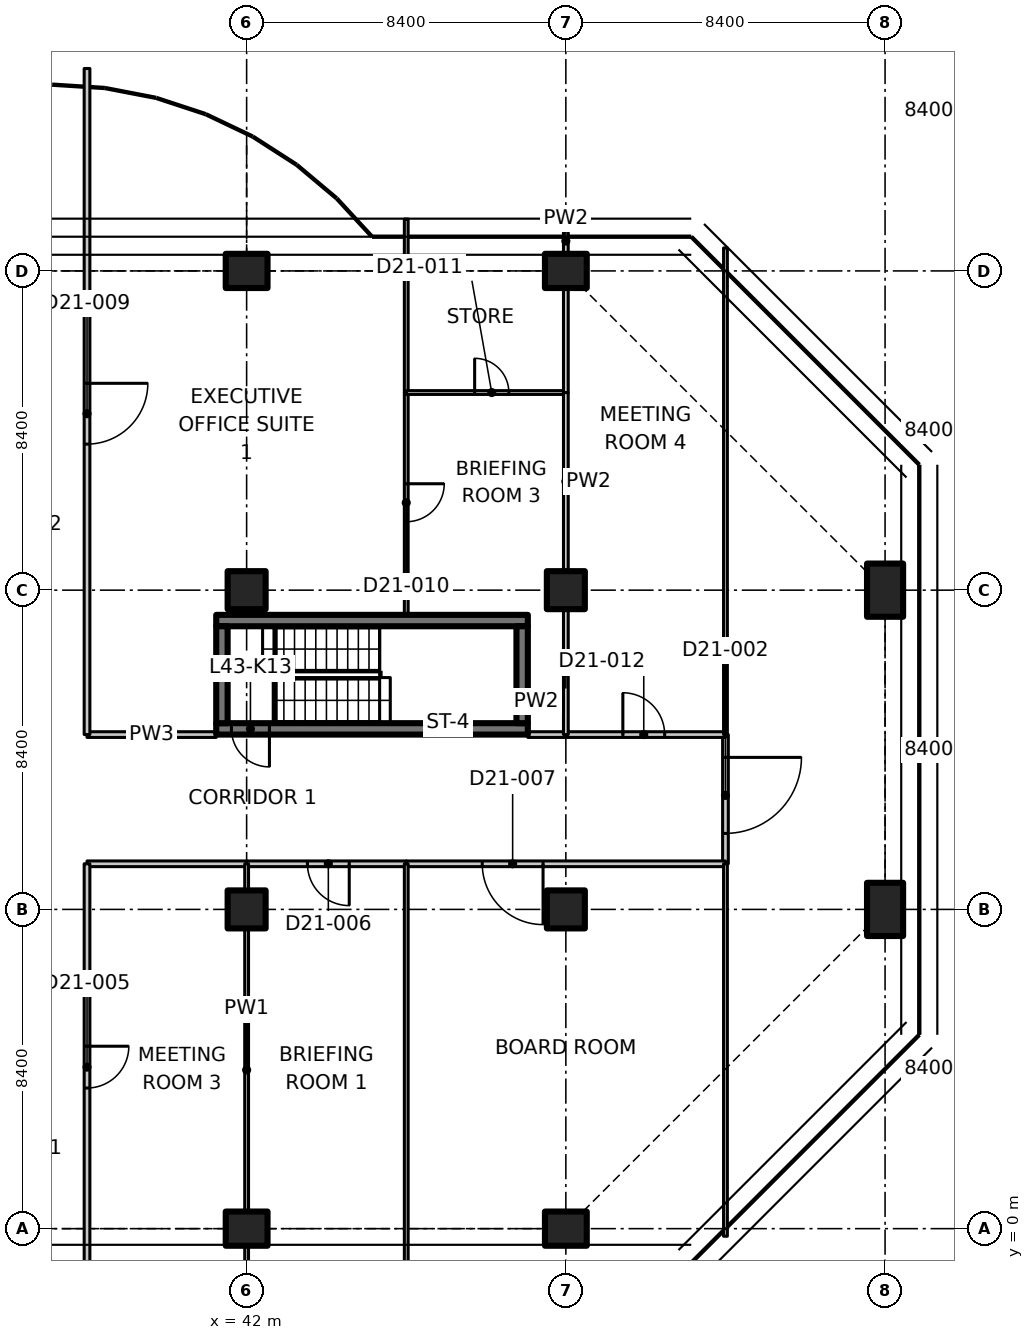
"""IFC4 building model, lengths in metres.
Left out: names, types, materials, properties, quantities, classifications, styles, units other than length and angle.
Written with IfcOpenShell. Run it as: python <this file> out.ifc"""

import sys

from ifc_helpers import new_model, si_unit, direction, frame, frame_2d, origin, origin_2d, place, context, subcontext, project, spatial, polyline, rectangle, outline, extrude, element, fill, save


model = new_model("IFC4")
c1 = context("Model", 3, precision=1e-05, world=origin(), true_north=direction((0.0, 1.0)))
c2 = subcontext(c1, "Body", "Model", "MODEL_VIEW")
j1 = project(units=[si_unit("LENGTHUNIT", "METRE"), si_unit("PLANEANGLEUNIT", "RADIAN")], contexts=[c1])
p1 = place(None, origin())
s1 = spatial("IfcSite", under=j1, at=p1, CompositionType="ELEMENT")
p2 = place(p1, origin())
s2 = spatial("IfcBuilding", under=s1, at=p2, CompositionType="ELEMENT")
p3 = place(p2, frame((0.0, 0.0, 174.0)))
s3 = spatial("IfcBuildingStorey", under=s2, at=p3, CompositionType="ELEMENT", Elevation=174.0)
p4 = place(p3, frame((42.0, 0.0, 0.0), z_axis=(0.0, 0.0, 1.0), x_axis=(0.0, 1.0, 0.0)))
e1 = element("IfcColumn", 1, at=p4, inside=s3, PredefinedType="COLUMN", context=c2, shape_type="SweptSolid", body=[
    extrude(rectangle(XDim=0.9, YDim=1.1, at=origin_2d()), origin(), (0.0, 0.0, 1.0), 3.35),
])
for number, where, z_axis, x_axis in (
    (2, (42.0, 8.4, 0.0), (0.0, 0.0, 1.0), (1.0, 0.0, 0.0)),
    (3, (42.0, 16.8, 0.0), (0.0, 0.0, 1.0), (1.0, 0.0, 0.0)),
):
    element("IfcColumn", number, at=place(p3, frame(where, z_axis=z_axis, x_axis=x_axis)), inside=s3, PredefinedType="COLUMN", context=c2, shape_type="SweptSolid", body=[
        extrude(rectangle(XDim=1.0, YDim=1.0, at=origin_2d()), origin(), (0.0, 0.0, 1.0), 3.35),
    ])
for number, where, z_axis, x_axis in (
    (4, (42.0, 25.2, 0.0), (0.0, 0.0, 1.0), (0.0, 1.0, 0.0)),
    (5, (50.4, 0.0, 0.0), (0.0, 0.0, 1.0), (0.0, 1.0, 0.0)),
):
    element("IfcColumn", number, at=place(p3, frame(where, z_axis=z_axis, x_axis=x_axis)), inside=s3, PredefinedType="COLUMN", context=c2, shape_type="SweptSolid", body=[
        extrude(rectangle(XDim=0.9, YDim=1.1, at=origin_2d()), origin(), (0.0, 0.0, 1.0), 3.35),
    ])
for number, where, z_axis, x_axis in (
    (6, (50.4, 8.4, 0.0), (0.0, 0.0, 1.0), (1.0, 0.0, 0.0)),
    (7, (50.4, 16.8, 0.0), (0.0, 0.0, 1.0), (1.0, 0.0, 0.0)),
):
    element("IfcColumn", number, at=place(p3, frame(where, z_axis=z_axis, x_axis=x_axis)), inside=s3, PredefinedType="COLUMN", context=c2, shape_type="SweptSolid", body=[
        extrude(rectangle(XDim=1.0, YDim=1.0, at=origin_2d()), origin(), (0.0, 0.0, 1.0), 3.35),
    ])
p5 = place(p3, frame((50.4, 25.2, 0.0), z_axis=(0.0, 0.0, 1.0), x_axis=(0.0, 1.0, 0.0)))
e8 = element("IfcColumn", 8, at=p5, inside=s3, PredefinedType="COLUMN", context=c2, shape_type="SweptSolid", body=[
    extrude(rectangle(XDim=0.9, YDim=1.1, at=origin_2d()), origin(), (0.0, 0.0, 1.0), 3.35),
])
for number, where, z_axis, x_axis in (
    (9, (58.8, 8.4, 0.0), (0.0, 0.0, 1.0), (1.0, 0.0, 0.0)),
    (10, (58.8, 16.8, 0.0), (0.0, 0.0, 1.0), (1.0, 0.0, 0.0)),
):
    element("IfcColumn", number, at=place(p3, frame(where, z_axis=z_axis, x_axis=x_axis)), inside=s3, PredefinedType="COLUMN", context=c2, shape_type="SweptSolid", body=[
        extrude(rectangle(XDim=0.95, YDim=1.4, at=origin_2d()), origin(), (0.0, 0.0, 1.0), 3.35),
    ])
p6 = place(p3, frame((49.4, 13.15, 0.0), z_axis=(0.0, 0.0, 1.0), x_axis=(-1.0, 0.0, 0.0)))
e11 = element("IfcWall", 11, at=p6, inside=s3, PredefinedType="SHEAR", context=c2, shape_type="SweptSolid", body=[
    extrude(rectangle(XDim=8.2, YDim=0.3, at=frame_2d((4.1, 0.0))), origin(), (0.0, 0.0, 1.0), 3.35),
])
p7 = place(p6, frame((6.8, 0.0, 0.0)))
e12 = element("IfcOpeningElement", 12, at=p7, cuts=e11, PredefinedType="OPENING", context=c2, shape_type="SweptSolid", body=[
    extrude(rectangle(XDim=1.0, YDim=2.1, at=frame_2d((0.5, 1.05))), frame((0.0, 0.16, 0.0), z_axis=(0.0, -1.0, 0.0), x_axis=(1.0, 0.0, 0.0)), (0.0, 0.0, 1.0), 0.32),
])
p8 = place(p3, frame((41.2, 16.0, 0.0), z_axis=(0.0, 0.0, 1.0), x_axis=(1.0, 0.0, 0.0)))
e13 = element("IfcWall", 13, at=p8, inside=s3, PredefinedType="SHEAR", context=c2, shape_type="SweptSolid", body=[
    extrude(rectangle(XDim=8.2, YDim=0.3, at=frame_2d((4.1, 0.0))), origin(), (0.0, 0.0, 1.0), 3.35),
])
for number, where, z_axis, x_axis in (
    (14, (41.35, 13.3, 0.0), (0.0, 0.0, 1.0), (0.0, 1.0, 0.0)),
    (15, (49.25, 13.3, 0.0), (0.0, 0.0, 1.0), (0.0, 1.0, 0.0)),
):
    element("IfcWall", number, at=place(p3, frame(where, z_axis=z_axis, x_axis=x_axis)), inside=s3, PredefinedType="SHEAR", context=c2, shape_type="SweptSolid", body=[
        extrude(rectangle(XDim=2.55, YDim=0.3, at=frame_2d((1.275, 0.0))), origin(), (0.0, 0.0, 1.0), 3.35),
    ])
p9 = place(p3, frame((54.6, 13.0, 0.0), z_axis=(0.0, 0.0, 1.0), x_axis=(0.0, -1.0, 0.0)))
e16 = element("IfcWall", 16, at=p9, inside=s3, PredefinedType="PARTITIONING", context=c2, shape_type="SweptSolid", body=[
    extrude(rectangle(XDim=3.4, YDim=0.15, at=frame_2d((1.7, 0.0))), origin(), (0.0, 0.0, 1.0), 3.33),
])
p10 = place(p9, frame((0.6, 0.0, 0.0)))
e17 = element("IfcOpeningElement", 17, at=p10, cuts=e16, PredefinedType="OPENING", context=c2, shape_type="SweptSolid", body=[
    extrude(rectangle(XDim=2.0, YDim=2.4, at=frame_2d((1.0, 1.2))), frame((0.0, 0.085, 0.0), z_axis=(0.0, -1.0, 0.0), x_axis=(1.0, 0.0, 0.0)), (0.0, 0.0, 1.0), 0.17),
])
p11 = place(p3, frame((42.0, 9.6, 0.0), z_axis=(0.0, 0.0, 1.0), x_axis=(-1.0, 0.0, 0.0)))
e18 = element("IfcWall", 18, at=p11, inside=s3, PredefinedType="PARTITIONING", context=c2, shape_type="SweptSolid", body=[
    extrude(rectangle(XDim=4.2, YDim=0.15, at=frame_2d((2.1, 0.0))), origin(), (0.0, 0.0, 1.0), 3.33),
])
p12 = place(p3, frame((46.2, 9.6, 0.0), z_axis=(0.0, 0.0, 1.0), x_axis=(-1.0, 0.0, 0.0)))
e19 = element("IfcWall", 19, at=p12, inside=s3, PredefinedType="PARTITIONING", context=c2, shape_type="SweptSolid", body=[
    extrude(rectangle(XDim=4.2, YDim=0.15, at=frame_2d((2.1, 0.0))), origin(), (0.0, 0.0, 1.0), 3.33),
])
p13 = place(p12, frame((1.5, 0.0, 0.0)))
e20 = element("IfcOpeningElement", 20, at=p13, cuts=e19, PredefinedType="OPENING", context=c2, shape_type="SweptSolid", body=[
    extrude(rectangle(XDim=1.1, YDim=2.1, at=frame_2d((0.55, 1.05))), frame((0.0, 0.085, 0.0), z_axis=(0.0, -1.0, 0.0), x_axis=(1.0, 0.0, 0.0)), (0.0, 0.0, 1.0), 0.17),
])
p14 = place(p3, frame((54.6, 9.6, 0.0), z_axis=(0.0, 0.0, 1.0), x_axis=(-1.0, 0.0, 0.0)))
e21 = element("IfcWall", 21, at=p14, inside=s3, PredefinedType="PARTITIONING", context=c2, shape_type="SweptSolid", body=[
    extrude(rectangle(XDim=8.4, YDim=0.15, at=frame_2d((4.2, 0.0))), origin(), (0.0, 0.0, 1.0), 3.33),
])
p15 = place(p14, frame((4.8, 0.0, 0.0)))
e22 = element("IfcOpeningElement", 22, at=p15, cuts=e21, PredefinedType="OPENING", context=c2, shape_type="SweptSolid", body=[
    extrude(rectangle(XDim=1.6, YDim=2.1, at=frame_2d((0.8, 1.05))), frame((0.0, 0.085, 0.0), z_axis=(0.0, -1.0, 0.0), x_axis=(1.0, 0.0, 0.0)), (0.0, 0.0, 1.0), 0.17),
])
p16 = place(p3, frame((37.8, 13.0, 0.0), z_axis=(0.0, 0.0, 1.0), x_axis=(1.0, 0.0, 0.0)))
e23 = element("IfcWall", 23, at=p16, inside=s3, PredefinedType="PARTITIONING", context=c2, shape_type="SweptSolid", body=[
    extrude(rectangle(XDim=3.4, YDim=0.15, at=frame_2d((1.7, 0.0))), origin(), (0.0, 0.0, 1.0), 3.33),
])
p17 = place(p3, frame((49.4, 13.0, 0.0), z_axis=(0.0, 0.0, 1.0), x_axis=(1.0, 0.0, 0.0)))
e24 = element("IfcWall", 24, at=p17, inside=s3, PredefinedType="PARTITIONING", context=c2, shape_type="SweptSolid", body=[
    extrude(rectangle(XDim=1.0, YDim=0.15, at=frame_2d((0.5, 0.0))), origin(), (0.0, 0.0, 1.0), 3.33),
])
p18 = place(p3, frame((50.4, 13.0, 0.0), z_axis=(0.0, 0.0, 1.0), x_axis=(1.0, 0.0, 0.0)))
e25 = element("IfcWall", 25, at=p18, inside=s3, PredefinedType="PARTITIONING", context=c2, shape_type="SweptSolid", body=[
    extrude(rectangle(XDim=4.2, YDim=0.15, at=frame_2d((2.1, 0.0))), origin(), (0.0, 0.0, 1.0), 3.33),
])
p19 = place(p18, frame((1.5, 0.0, 0.0)))
e26 = element("IfcOpeningElement", 26, at=p19, cuts=e25, PredefinedType="OPENING", context=c2, shape_type="SweptSolid", body=[
    extrude(rectangle(XDim=1.1, YDim=2.1, at=frame_2d((0.55, 1.05))), frame((0.0, 0.085, 0.0), z_axis=(0.0, -1.0, 0.0), x_axis=(1.0, 0.0, 0.0)), (0.0, 0.0, 1.0), 0.17),
])
p20 = place(p3, frame((54.6, -0.2, 0.0), z_axis=(0.0, 0.0, 1.0), x_axis=(0.0, 1.0, 0.0)))
e27 = element("IfcWall", 27, at=p20, inside=s3, PredefinedType="PARTITIONING", context=c2, shape_type="SweptSolid", body=[
    extrude(outline(polyline([(0.0, 0.0), (9.8, 0.0), (9.8, 3.33), (5.066, 3.33), (5.064, 2.98), (3.736, 2.98), (3.734, 3.33), (0.0, 3.33), (0.0, 0.0)])), frame((0.0, 0.05, 0.0), z_axis=(0.0, -1.0, 0.0), x_axis=(1.0, 0.0, 0.0)), (0.0, 0.0, 1.0), 0.1),
])
p21 = place(p3, frame((54.6, 13.0, 0.0), z_axis=(0.0, 0.0, 1.0), x_axis=(0.0, 1.0, 0.0)))
e28 = element("IfcWall", 28, at=p21, inside=s3, PredefinedType="PARTITIONING", context=c2, shape_type="SweptSolid", body=[
    extrude(outline(polyline([(0.0, 0.0), (12.805, 0.0), (12.805, 3.33), (12.4, 3.33), (8.666, 3.33), (8.664, 2.98), (7.336, 2.98), (7.334, 3.33), (0.0, 3.33), (0.0, 0.0)])), frame((0.0, 0.05, 0.0), z_axis=(0.0, -1.0, 0.0), x_axis=(1.0, 0.0, 0.0)), (0.0, 0.0, 1.0), 0.1),
])
p22 = place(p3, frame((37.8, 9.6, 0.0), z_axis=(0.0, 0.0, 1.0), x_axis=(0.0, -1.0, 0.0)))
e29 = element("IfcWall", 29, at=p22, inside=s3, PredefinedType="PARTITIONING", context=c2, shape_type="SweptSolid", body=[
    extrude(outline(polyline([(0.0, 0.0), (10.774, 0.0), (10.774, 3.33), (10.7, 3.33), (10.05, 3.33), (10.048, 2.98), (9.152, 2.98), (9.15, 3.33), (0.0, 3.33), (0.0, 0.0)])), frame((0.0, 0.075, 0.0), z_axis=(0.0, -1.0, 0.0), x_axis=(1.0, 0.0, 0.0)), (0.0, 0.0, 1.0), 0.15),
])
p23 = place(p22, frame((4.8, 0.0, 0.0)))
e30 = element("IfcOpeningElement", 30, at=p23, cuts=e29, PredefinedType="OPENING", context=c2, shape_type="SweptSolid", body=[
    extrude(rectangle(XDim=1.1, YDim=2.1, at=frame_2d((0.55, 1.05))), frame((0.0, 0.085, 0.0), z_axis=(0.0, -1.0, 0.0), x_axis=(1.0, 0.0, 0.0)), (0.0, 0.0, 1.0), 0.17),
])
p24 = place(p3, frame((42.0, 9.6, 0.0), z_axis=(0.0, 0.0, 1.0), x_axis=(0.0, -1.0, 0.0)))
e31 = element("IfcWall", 31, at=p24, inside=s3, PredefinedType="PARTITIONING", context=c2, shape_type="SweptSolid", body=[
    extrude(rectangle(XDim=0.68, YDim=0.1, at=frame_2d((0.34, 0.0))), origin(), (0.0, 0.0, 1.0), 3.33),
])
p25 = place(p3, frame((42.0, 7.88, 0.0), z_axis=(0.0, 0.0, 1.0), x_axis=(0.0, -1.0, 0.0)))
e32 = element("IfcWall", 32, at=p25, inside=s3, PredefinedType="PARTITIONING", context=c2, shape_type="SweptSolid", body=[
    extrude(rectangle(XDim=7.41, YDim=0.1, at=frame_2d((3.705, 0.0))), origin(), (0.0, 0.0, 1.0), 3.33),
])
p26 = place(p3, frame((42.0, -0.47, 0.0), z_axis=(0.0, 0.0, 1.0), x_axis=(0.0, -1.0, 0.0)))
e33 = element("IfcWall", 33, at=p26, inside=s3, PredefinedType="PARTITIONING", context=c2, shape_type="SweptSolid", body=[
    extrude(rectangle(XDim=0.63, YDim=0.1, at=frame_2d((0.315, 0.0))), origin(), (0.0, 0.0, 1.0), 3.33),
])
p27 = place(p3, frame((46.2, 9.6, 0.0), z_axis=(0.0, 0.0, 1.0), x_axis=(0.0, -1.0, 0.0)))
e34 = element("IfcWall", 34, at=p27, inside=s3, PredefinedType="PARTITIONING", context=c2, shape_type="SweptSolid", body=[
    extrude(outline(polyline([(0.0, 0.0), (10.774, 0.0), (10.774, 3.33), (10.7, 3.33), (10.05, 3.33), (10.048, 2.98), (9.152, 2.98), (9.15, 3.33), (0.0, 3.33), (0.0, 0.0)])), frame((0.0, 0.05, 0.0), z_axis=(0.0, -1.0, 0.0), x_axis=(1.0, 0.0, 0.0)), (0.0, 0.0, 1.0), 0.1),
])
p28 = place(p3, frame((37.8, 30.526, 0.0), z_axis=(0.0, 0.0, 1.0), x_axis=(0.0, -1.0, 0.0)))
e35 = element("IfcWall", 35, at=p28, inside=s3, PredefinedType="PARTITIONING", context=c2, shape_type="SweptSolid", body=[
    extrude(outline(polyline([(0.0, 0.0), (17.526, 0.0), (17.526, 3.33), (5.776, 3.33), (5.774, 2.98), (4.878, 2.98), (4.876, 3.33), (0.283, 3.33), (0.0, 3.33), (0.0, 0.0)])), frame((0.0, 0.075, 0.0), z_axis=(0.0, -1.0, 0.0), x_axis=(1.0, 0.0, 0.0)), (0.0, 0.0, 1.0), 0.15),
])
p29 = place(p28, frame((8.283, 0.0, 0.0)))
e36 = element("IfcOpeningElement", 36, at=p29, cuts=e35, PredefinedType="OPENING", context=c2, shape_type="SweptSolid", body=[
    extrude(rectangle(XDim=1.6, YDim=2.1, at=frame_2d((0.8, 1.05))), frame((0.0, 0.085, 0.0), z_axis=(0.0, -1.0, 0.0), x_axis=(1.0, 0.0, 0.0)), (0.0, 0.0, 1.0), 0.17),
])
p30 = place(p3, frame((46.2, 22.0, 0.0), z_axis=(0.0, 0.0, 1.0), x_axis=(0.0, -1.0, 0.0)))
e37 = element("IfcWall", 37, at=p30, inside=s3, PredefinedType="PARTITIONING", context=c2, shape_type="SweptSolid", body=[
    extrude(rectangle(XDim=5.85, YDim=0.1, at=frame_2d((2.925, 0.0))), origin(), (0.0, 0.0, 1.0), 3.33),
])
p31 = place(p30, frame((2.4, 0.0, 0.0)))
e38 = element("IfcOpeningElement", 38, at=p31, cuts=e37, PredefinedType="OPENING", context=c2, shape_type="SweptSolid", body=[
    extrude(rectangle(XDim=1.0, YDim=2.1, at=frame_2d((0.5, 1.05))), frame((0.0, 0.06, 0.0), z_axis=(0.0, -1.0, 0.0), x_axis=(1.0, 0.0, 0.0)), (0.0, 0.0, 1.0), 0.12),
])
p32 = place(p3, frame((46.2, 26.565, 0.0), z_axis=(0.0, 0.0, 1.0), x_axis=(0.0, -1.0, 0.0)))
e39 = element("IfcWall", 39, at=p32, inside=s3, PredefinedType="PARTITIONING", context=c2, shape_type="SweptSolid", body=[
    extrude(rectangle(XDim=4.565, YDim=0.1, at=frame_2d((2.282, 0.0))), origin(), (0.0, 0.0, 1.0), 2.98),
])
p33 = place(p3, frame((46.2, 22.0, 0.0), z_axis=(0.0, 0.0, 1.0), x_axis=(1.0, 0.0, 0.0)))
e40 = element("IfcWall", 40, at=p33, inside=s3, PredefinedType="PARTITIONING", context=c2, shape_type="SweptSolid", body=[
    extrude(rectangle(XDim=4.2, YDim=0.1, at=frame_2d((2.1, 0.0))), origin(), (0.0, 0.0, 1.0), 3.33),
])
p34 = place(p33, frame((1.8, 0.0, 0.0)))
e41 = element("IfcOpeningElement", 41, at=p34, cuts=e40, PredefinedType="OPENING", context=c2, shape_type="SweptSolid", body=[
    extrude(rectangle(XDim=0.9, YDim=2.1, at=frame_2d((0.45, 1.05))), frame((0.0, 0.06, 0.0), z_axis=(0.0, -1.0, 0.0), x_axis=(1.0, 0.0, 0.0)), (0.0, 0.0, 1.0), 0.12),
])
p35 = place(p3, frame((50.4, 22.0, 0.0), z_axis=(0.0, 0.0, 1.0), x_axis=(0.0, -1.0, 0.0)))
e42 = element("IfcWall", 42, at=p35, inside=s3, PredefinedType="PARTITIONING", context=c2, shape_type="SweptSolid", body=[
    extrude(rectangle(XDim=4.68, YDim=0.125, at=frame_2d((2.34, 0.0))), origin(), (0.0, 0.0, 1.0), 3.33),
])
p36 = place(p3, frame((50.4, 16.28, 0.0), z_axis=(0.0, 0.0, 1.0), x_axis=(0.0, -1.0, 0.0)))
e43 = element("IfcWall", 43, at=p36, inside=s3, PredefinedType="PARTITIONING", context=c2, shape_type="SweptSolid", body=[
    extrude(rectangle(XDim=3.28, YDim=0.125, at=frame_2d((1.64, 0.0))), origin(), (0.0, 0.0, 1.0), 3.33),
])
p37 = place(p3, frame((50.4, 26.3, 0.0), z_axis=(0.0, 0.0, 1.0), x_axis=(0.0, -1.0, 0.0)))
e44 = element("IfcWall", 44, at=p37, inside=s3, PredefinedType="PARTITIONING", context=c2, shape_type="SweptSolid", body=[
    extrude(rectangle(XDim=0.63, YDim=0.125, at=frame_2d((0.315, 0.0))), origin(), (0.0, 0.0, 1.0), 3.33),
])
p38 = place(p3, frame((50.4, 24.73, 0.0), z_axis=(0.0, 0.0, 1.0), x_axis=(0.0, -1.0, 0.0)))
e45 = element("IfcWall", 45, at=p38, inside=s3, PredefinedType="PARTITIONING", context=c2, shape_type="SweptSolid", body=[
    extrude(rectangle(XDim=2.73, YDim=0.125, at=frame_2d((1.365, 0.0))), origin(), (0.0, 0.0, 1.0), 2.98),
])
p39 = place(p7, origin())
e46 = element("IfcDoor", 46, at=p39, inside=s3, OperationType="SINGLE_SWING_LEFT", PredefinedType="DOOR", context=c2, shape_type="SweptSolid", body=[
    extrude(rectangle(XDim=1.0, YDim=2.1, at=frame_2d((0.5, 1.05))), frame((0.0, 0.025, 0.0), z_axis=(0.0, -1.0, 0.0), x_axis=(1.0, 0.0, 0.0)), (0.0, 0.0, 1.0), 0.05),
])
fill(e12, e46)
p40 = place(p10, origin())
e47 = element("IfcDoor", 47, at=p40, inside=s3, OperationType="DOUBLE_DOOR_SINGLE_SWING", PredefinedType="DOOR", context=c2, shape_type="SweptSolid", body=[
    extrude(rectangle(XDim=2.0, YDim=2.4, at=frame_2d((1.0, 1.2))), frame((0.0, 0.025, 0.0), z_axis=(0.0, -1.0, 0.0), x_axis=(1.0, 0.0, 0.0)), (0.0, 0.0, 1.0), 0.05),
])
fill(e17, e47)
p41 = place(p23, origin())
e48 = element("IfcDoor", 48, at=p41, inside=s3, OperationType="SINGLE_SWING_LEFT", PredefinedType="DOOR", context=c2, shape_type="SweptSolid", body=[
    extrude(rectangle(XDim=1.1, YDim=2.1, at=frame_2d((0.55, 1.05))), frame((0.0, 0.025, 0.0), z_axis=(0.0, -1.0, 0.0), x_axis=(1.0, 0.0, 0.0)), (0.0, 0.0, 1.0), 0.05),
])
fill(e30, e48)
p42 = place(p13, origin())
e49 = element("IfcDoor", 49, at=p42, inside=s3, OperationType="SINGLE_SWING_LEFT", PredefinedType="DOOR", context=c2, shape_type="SweptSolid", body=[
    extrude(rectangle(XDim=1.1, YDim=2.1, at=frame_2d((0.55, 1.05))), frame((0.0, 0.025, 0.0), z_axis=(0.0, -1.0, 0.0), x_axis=(1.0, 0.0, 0.0)), (0.0, 0.0, 1.0), 0.05),
])
fill(e20, e49)
p43 = place(p15, origin())
e50 = element("IfcDoor", 50, at=p43, inside=s3, OperationType="DOUBLE_DOOR_SINGLE_SWING", PredefinedType="DOOR", context=c2, shape_type="SweptSolid", body=[
    extrude(rectangle(XDim=1.6, YDim=2.1, at=frame_2d((0.8, 1.05))), frame((0.0, 0.025, 0.0), z_axis=(0.0, -1.0, 0.0), x_axis=(1.0, 0.0, 0.0)), (0.0, 0.0, 1.0), 0.05),
])
fill(e22, e50)
p44 = place(p29, origin())
e51 = element("IfcDoor", 51, at=p44, inside=s3, OperationType="DOUBLE_DOOR_SINGLE_SWING", PredefinedType="DOOR", context=c2, shape_type="SweptSolid", body=[
    extrude(rectangle(XDim=1.6, YDim=2.1, at=frame_2d((0.8, 1.05))), frame((0.0, 0.025, 0.0), z_axis=(0.0, -1.0, 0.0), x_axis=(1.0, 0.0, 0.0)), (0.0, 0.0, 1.0), 0.05),
])
fill(e36, e51)
p45 = place(p31, origin())
e52 = element("IfcDoor", 52, at=p45, inside=s3, OperationType="SINGLE_SWING_LEFT", PredefinedType="DOOR", context=c2, shape_type="SweptSolid", body=[
    extrude(rectangle(XDim=1.0, YDim=2.1, at=frame_2d((0.5, 1.05))), frame((0.0, 0.025, 0.0), z_axis=(0.0, -1.0, 0.0), x_axis=(1.0, 0.0, 0.0)), (0.0, 0.0, 1.0), 0.05),
])
fill(e38, e52)
p46 = place(p34, origin())
e53 = element("IfcDoor", 53, at=p46, inside=s3, OperationType="SINGLE_SWING_LEFT", PredefinedType="DOOR", context=c2, shape_type="SweptSolid", body=[
    extrude(rectangle(XDim=0.9, YDim=2.1, at=frame_2d((0.45, 1.05))), frame((0.0, 0.025, 0.0), z_axis=(0.0, -1.0, 0.0), x_axis=(1.0, 0.0, 0.0)), (0.0, 0.0, 1.0), 0.05),
])
fill(e41, e53)
p47 = place(p19, origin())
e54 = element("IfcDoor", 54, at=p47, inside=s3, OperationType="SINGLE_SWING_LEFT", PredefinedType="DOOR", context=c2, shape_type="SweptSolid", body=[
    extrude(rectangle(XDim=1.1, YDim=2.1, at=frame_2d((0.55, 1.05))), frame((0.0, 0.025, 0.0), z_axis=(0.0, -1.0, 0.0), x_axis=(1.0, 0.0, 0.0)), (0.0, 0.0, 1.0), 0.05),
])
fill(e26, e54)
save(model, sys.argv[1])
